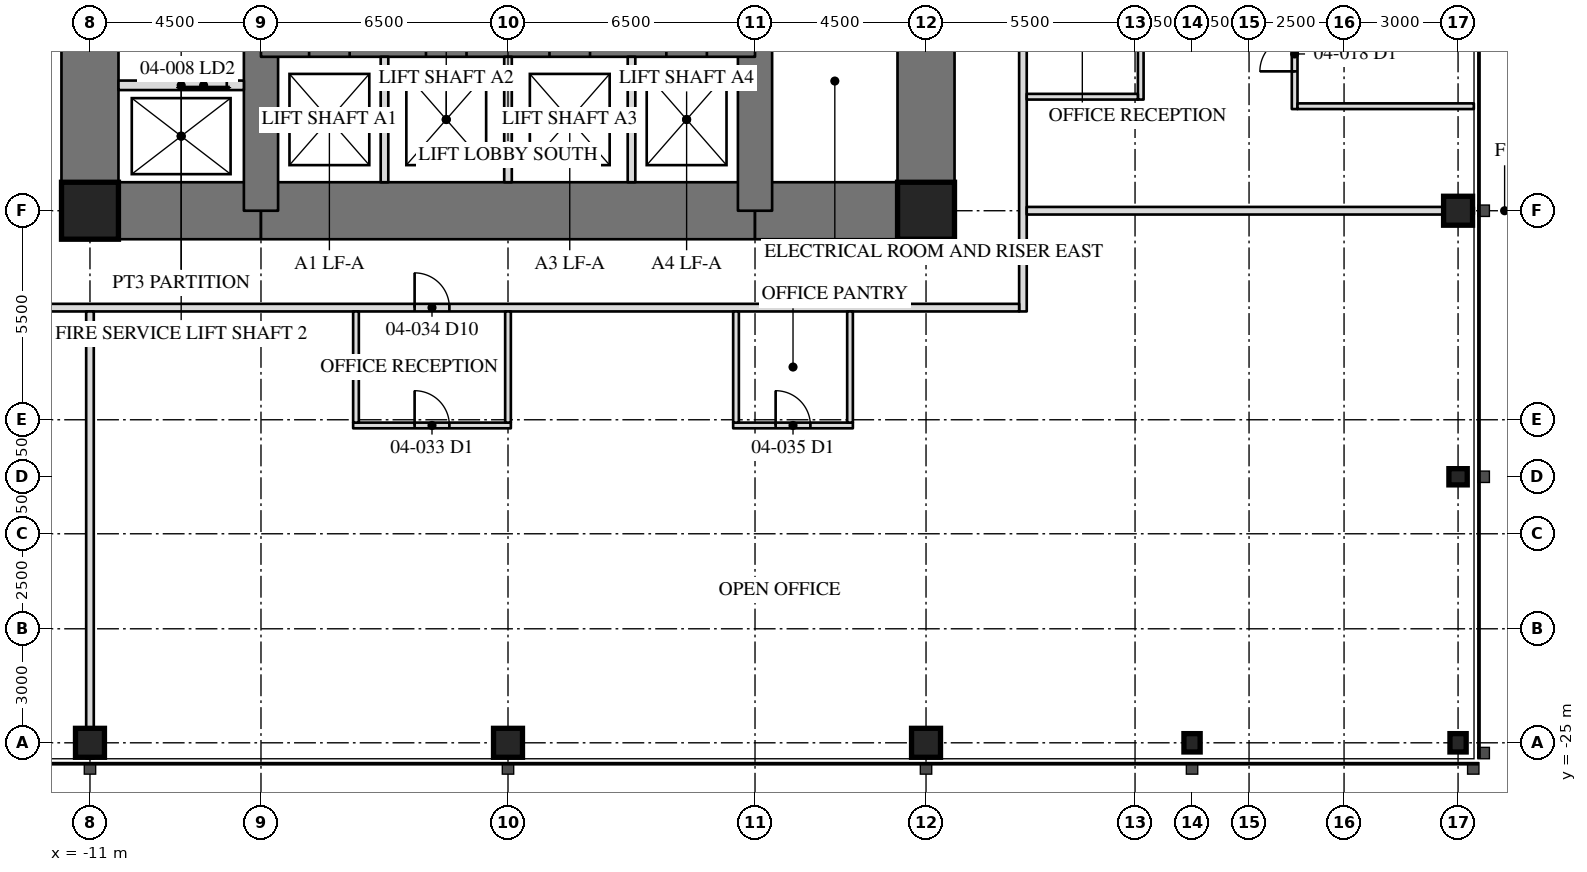
"""IFC4 building model, lengths in metres.
Left out: names, types, materials, properties, quantities, classifications, styles, units other than length and angle.
Written with IfcOpenShell. Run it as: python <this file> out.ifc"""

import sys

from ifc_helpers import new_model, si_unit, direction, frame, frame_2d, origin, origin_2d, place, context, subcontext, project, spatial, rectangle, hollow_rectangle, i_section, extrude, element, fill, save


model = new_model("IFC4")
c1 = context("Model", 3, precision=1e-05, world=origin(), true_north=direction((0.0, 1.0)))
c2 = subcontext(c1, "Body", "Model", "MODEL_VIEW")
j1 = project(units=[si_unit("LENGTHUNIT", "METRE"), si_unit("PLANEANGLEUNIT", "RADIAN")], contexts=[c1])
p1 = place(None, origin())
s1 = spatial("IfcSite", under=j1, at=p1, CompositionType="ELEMENT")
p2 = place(p1, origin())
s2 = spatial("IfcBuilding", under=s1, at=p2, CompositionType="ELEMENT")
p3 = place(p2, frame((0.0, 0.0, 20.1)))
s3 = spatial("IfcBuildingStorey", under=s2, at=p3, CompositionType="ELEMENT", Elevation=20.1)
for number, where, z_axis, x_axis in (
    (1, (-11.0, -25.0, 0.0), (0.0, 0.0, 1.0), (1.0, 0.0, 0.0)),
    (2, (0.0, -25.0, 0.0), (0.0, 0.0, 1.0), (1.0, 0.0, 0.0)),
    (3, (11.0, -25.0, 0.0), (0.0, 0.0, 1.0), (1.0, 0.0, 0.0)),
):
    element("IfcColumn", number, at=place(p3, frame(where, z_axis=z_axis, x_axis=x_axis)), inside=s3, PredefinedType="COLUMN", context=c2, shape_type="SweptSolid", body=[
        extrude(hollow_rectangle(XDim=0.762, YDim=0.762, WallThickness=0.152, at=origin_2d()), origin(), (0.0, 0.0, 1.0), 4.1),
    ])
for number, where, z_axis, x_axis in (
    (4, (18.0, -25.0, 0.0), (0.0, 0.0, 1.0), (1.0, 0.0, 0.0)),
    (5, (25.0, -25.0, 0.0), (0.0, 0.0, 1.0), (1.0, 0.0, 0.0)),
    (6, (25.0, -18.0, 0.0), (0.0, 0.0, 1.0), (0.0, 1.0, 0.0)),
):
    element("IfcColumn", number, at=place(p3, frame(where, z_axis=z_axis, x_axis=x_axis)), inside=s3, PredefinedType="COLUMN", context=c2, shape_type="SweptSolid", body=[
        extrude(i_section(OverallWidth=0.427, OverallDepth=0.483, WebThickness=0.051, FlangeThickness=0.082, at=origin_2d()), origin(), (0.0, 0.0, 1.0), 4.1),
    ])
p4 = place(p3, frame((25.0, -11.0, 0.0), z_axis=(0.0, 0.0, 1.0), x_axis=(0.0, 1.0, 0.0)))
e7 = element("IfcColumn", 7, at=p4, inside=s3, PredefinedType="COLUMN", context=c2, shape_type="SweptSolid", body=[
    extrude(hollow_rectangle(XDim=0.762, YDim=0.762, WallThickness=0.152, at=origin_2d()), origin(), (0.0, 0.0, 1.0), 4.1),
])
p5 = place(p3, frame((11.0, -11.0, 0.0), z_axis=(0.0, 0.0, 1.0), x_axis=(0.0, 1.0, 0.0)))
e8 = element("IfcWall", 8, at=p5, inside=s3, PredefinedType="SHEAR", context=c2, shape_type="SweptSolid", body=[
    extrude(rectangle(XDim=22.0, YDim=1.5, at=frame_2d((11.0, 0.0))), origin(), (0.0, 0.0, 1.0), 4.1),
])
p6 = place(p5, frame((15.393, 0.0, 0.0)))
e9 = element("IfcOpeningElement", 9, at=p6, cuts=e8, PredefinedType="OPENING", context=c2, shape_type="SweptSolid", body=[
    extrude(rectangle(XDim=0.915, YDim=2.134, at=frame_2d((0.458, 1.067))), frame((0.0, 0.76, 0.0), z_axis=(0.0, -1.0, 0.0), x_axis=(1.0, 0.0, 0.0)), (0.0, 0.0, 1.0), 1.52),
])
p7 = place(p3, frame((-11.0, 11.0, 0.0), z_axis=(0.0, 0.0, 1.0), x_axis=(0.0, -1.0, 0.0)))
e10 = element("IfcWall", 10, at=p7, inside=s3, PredefinedType="SHEAR", context=c2, shape_type="SweptSolid", body=[
    extrude(rectangle(XDim=22.0, YDim=1.5, at=frame_2d((11.0, 0.0))), origin(), (0.0, 0.0, 1.0), 4.1),
])
p8 = place(p7, frame((15.393, 0.0, 0.0)))
e11 = element("IfcOpeningElement", 11, at=p8, cuts=e10, PredefinedType="OPENING", context=c2, shape_type="SweptSolid", body=[
    extrude(rectangle(XDim=0.915, YDim=2.134, at=frame_2d((0.458, 1.067))), frame((0.0, 0.76, 0.0), z_axis=(0.0, -1.0, 0.0), x_axis=(1.0, 0.0, 0.0)), (0.0, 0.0, 1.0), 1.52),
])
p9 = place(p3, frame((-11.0, -11.0, 0.0), z_axis=(0.0, 0.0, 1.0), x_axis=(1.0, 0.0, 0.0)))
e12 = element("IfcWall", 12, at=p9, inside=s3, PredefinedType="SHEAR", context=c2, shape_type="SweptSolid", body=[
    extrude(rectangle(XDim=4.5, YDim=1.5, at=frame_2d((2.25, 0.0))), origin(), (0.0, 0.0, 1.0), 4.1),
])
p10 = place(p3, frame((-6.5, -11.0, 0.0), z_axis=(0.0, 0.0, 1.0), x_axis=(1.0, 0.0, 0.0)))
e13 = element("IfcWall", 13, at=p10, inside=s3, PredefinedType="SHEAR", context=c2, shape_type="SweptSolid", body=[
    extrude(rectangle(XDim=13.0, YDim=1.5, at=frame_2d((6.5, 0.0))), origin(), (0.0, 0.0, 1.0), 4.1),
])
p11 = place(p3, frame((6.5, -11.0, 0.0), z_axis=(0.0, 0.0, 1.0), x_axis=(1.0, 0.0, 0.0)))
e14 = element("IfcWall", 14, at=p11, inside=s3, PredefinedType="SHEAR", context=c2, shape_type="SweptSolid", body=[
    extrude(rectangle(XDim=4.5, YDim=1.5, at=frame_2d((2.25, 0.0))), origin(), (0.0, 0.0, 1.0), 4.1),
])
for number, where, z_axis, x_axis in (
    (15, (6.5, -11.0, 0.0), (0.0, 0.0, 1.0), (0.0, 1.0, 0.0)),
    (16, (-6.5, -6.5, 0.0), (0.0, 0.0, 1.0), (0.0, -1.0, 0.0)),
):
    element("IfcWall", number, at=place(p3, frame(where, z_axis=z_axis, x_axis=x_axis)), inside=s3, PredefinedType="SHEAR", context=c2, shape_type="SweptSolid", body=[
        extrude(rectangle(XDim=4.5, YDim=0.9, at=frame_2d((2.25, 0.0))), origin(), (0.0, 0.0, 1.0), 4.1),
    ])
p12 = place(p3, frame((-6.5, -6.5, 0.0), z_axis=(0.0, 0.0, 1.0), x_axis=(1.0, 0.0, 0.0)))
e17 = element("IfcWall", 17, at=p12, inside=s3, PredefinedType="SHEAR", context=c2, shape_type="SweptSolid", body=[
    extrude(rectangle(XDim=13.0, YDim=0.9, at=frame_2d((6.5, 0.0))), origin(), (0.0, 0.0, 1.0), 4.1),
])
p13 = place(p12, frame((1.267, 0.0, 0.0)))
e18 = element("IfcOpeningElement", 18, at=p13, cuts=e17, PredefinedType="OPENING", context=c2, shape_type="SweptSolid", body=[
    extrude(rectangle(XDim=1.067, YDim=2.134, at=frame_2d((0.533, 1.067))), frame((0.0, 0.46, 0.0), z_axis=(0.0, -1.0, 0.0), x_axis=(1.0, 0.0, 0.0)), (0.0, 0.0, 1.0), 0.92),
])
p14 = place(p12, frame((4.342, 0.0, 0.0)))
e19 = element("IfcOpeningElement", 19, at=p14, cuts=e17, PredefinedType="OPENING", context=c2, shape_type="SweptSolid", body=[
    extrude(rectangle(XDim=1.067, YDim=2.134, at=frame_2d((0.533, 1.067))), frame((0.0, 0.46, 0.0), z_axis=(0.0, -1.0, 0.0), x_axis=(1.0, 0.0, 0.0)), (0.0, 0.0, 1.0), 0.92),
])
p15 = place(p12, frame((7.592, 0.0, 0.0)))
e20 = element("IfcOpeningElement", 20, at=p15, cuts=e17, PredefinedType="OPENING", context=c2, shape_type="SweptSolid", body=[
    extrude(rectangle(XDim=1.067, YDim=2.134, at=frame_2d((0.533, 1.067))), frame((0.0, 0.46, 0.0), z_axis=(0.0, -1.0, 0.0), x_axis=(1.0, 0.0, 0.0)), (0.0, 0.0, 1.0), 0.92),
])
p16 = place(p12, frame((10.667, 0.0, 0.0)))
e21 = element("IfcOpeningElement", 21, at=p16, cuts=e17, PredefinedType="OPENING", context=c2, shape_type="SweptSolid", body=[
    extrude(rectangle(XDim=1.067, YDim=2.134, at=frame_2d((0.533, 1.067))), frame((0.0, 0.46, 0.0), z_axis=(0.0, -1.0, 0.0), x_axis=(1.0, 0.0, 0.0)), (0.0, 0.0, 1.0), 0.92),
])
for number, where, z_axis, x_axis in (
    (22, (-11.0, -11.0, 0.0), (0.0, 0.0, 1.0), (1.0, 0.0, 0.0)),
    (23, (11.0, -11.0, 0.0), (0.0, 0.0, 1.0), (1.0, 0.0, 0.0)),
):
    element("IfcColumn", number, at=place(p3, frame(where, z_axis=z_axis, x_axis=x_axis)), inside=s3, PredefinedType="COLUMN", context=c2, shape_type="SweptSolid", body=[
        extrude(hollow_rectangle(XDim=1.499, YDim=1.499, WallThickness=0.102, at=origin_2d()), origin(), (0.0, 0.0, 1.0), 4.1),
    ])
p17 = place(p3, frame((-6.95, -7.7, 0.0), z_axis=(0.0, 0.0, 1.0), x_axis=(-1.0, 0.0, 0.0)))
e24 = element("IfcWall", 24, at=p17, inside=s3, PredefinedType="PARTITIONING", context=c2, shape_type="SweptSolid", body=[
    extrude(rectangle(XDim=3.3, YDim=0.25, at=frame_2d((1.65, 0.0))), origin(), (0.0, 0.0, 1.0), 3.91),
])
p18 = place(p17, frame((0.45, 0.0, 0.0)))
e25 = element("IfcOpeningElement", 25, at=p18, cuts=e24, PredefinedType="OPENING", context=c2, shape_type="SweptSolid", body=[
    extrude(rectangle(XDim=1.219, YDim=2.134, at=frame_2d((0.609, 1.067))), frame((0.0, 0.135, 0.0), z_axis=(0.0, -1.0, 0.0), x_axis=(1.0, 0.0, 0.0)), (0.0, 0.0, 1.0), 0.27),
])
for number, where, z_axis, x_axis in (
    (26, (-3.25, -10.25, 0.0), (0.0, 0.0, 1.0), (0.0, 1.0, 0.0)),
    (27, (0.0, -10.25, 0.0), (0.0, 0.0, 1.0), (0.0, 1.0, 0.0)),
    (28, (3.25, -10.25, 0.0), (0.0, 0.0, 1.0), (0.0, 1.0, 0.0)),
):
    element("IfcWall", number, at=place(p3, frame(where, z_axis=z_axis, x_axis=x_axis)), inside=s3, PredefinedType="PARTITIONING", context=c2, shape_type="SweptSolid", body=[
        extrude(rectangle(XDim=3.3, YDim=0.2, at=frame_2d((1.65, 0.0))), origin(), (0.0, 0.0, 1.0), 3.91),
    ])
p19 = place(p3, frame((13.55, -13.65, 0.0), z_axis=(0.0, 0.0, 1.0), x_axis=(0.0, 1.0, 0.0)))
e29 = element("IfcWall", 29, at=p19, inside=s3, PredefinedType="PARTITIONING", context=c2, shape_type="SweptSolid", body=[
    extrude(rectangle(XDim=27.1, YDim=0.2, at=frame_2d((13.55, 0.0))), origin(), (0.0, 0.0, 1.0), 3.91),
])
p20 = place(p19, frame((7.192, 0.0, 0.0)))
e30 = element("IfcOpeningElement", 30, at=p20, cuts=e29, PredefinedType="OPENING", context=c2, shape_type="SweptSolid", body=[
    extrude(rectangle(XDim=0.915, YDim=2.134, at=frame_2d((0.458, 1.067))), frame((0.0, 0.11, 0.0), z_axis=(0.0, -1.0, 0.0), x_axis=(1.0, 0.0, 0.0)), (0.0, 0.0, 1.0), 0.22),
])
p21 = place(p3, frame((-13.65, -13.55, 0.0), z_axis=(0.0, 0.0, 1.0), x_axis=(1.0, 0.0, 0.0)))
e31 = element("IfcWall", 31, at=p21, inside=s3, PredefinedType="PARTITIONING", context=c2, shape_type="SweptSolid", body=[
    extrude(rectangle(XDim=27.1, YDim=0.2, at=frame_2d((13.55, 0.0))), origin(), (0.0, 0.0, 1.0), 3.91),
])
p22 = place(p21, frame((11.192, 0.0, 0.0)))
e32 = element("IfcOpeningElement", 32, at=p22, cuts=e31, PredefinedType="OPENING", context=c2, shape_type="SweptSolid", body=[
    extrude(rectangle(XDim=0.915, YDim=2.134, at=frame_2d((0.458, 1.067))), frame((0.0, 0.11, 0.0), z_axis=(0.0, -1.0, 0.0), x_axis=(1.0, 0.0, 0.0)), (0.0, 0.0, 1.0), 0.22),
])
for number, where, z_axis, x_axis in (
    (33, (-11.0, -13.65, 0.0), (0.0, 0.0, 1.0), (0.0, -1.0, 0.0)),
    (34, (13.65, -11.0, 0.0), (0.0, 0.0, 1.0), (1.0, 0.0, 0.0)),
):
    element("IfcWall", number, at=place(p3, frame(where, z_axis=z_axis, x_axis=x_axis)), inside=s3, PredefinedType="PARTITIONING", context=c2, shape_type="SweptSolid", body=[
        extrude(rectangle(XDim=11.765, YDim=0.2, at=frame_2d((5.883, 0.0))), origin(), (0.0, 0.0, 1.0), 3.13),
    ])
p23 = place(p3, frame((20.7, -8.325, 0.0), z_axis=(0.0, 0.0, 1.0), x_axis=(0.0, 1.0, 0.0)))
e35 = element("IfcWall", 35, at=p23, inside=s3, PredefinedType="PARTITIONING", context=c2, shape_type="SweptSolid", body=[
    extrude(rectangle(XDim=11.15, YDim=0.15, at=frame_2d((5.575, 0.0))), origin(), (0.0, 0.0, 1.0), 3.91),
])
p24 = place(p23, frame((0.992, 0.0, 0.0)))
e36 = element("IfcOpeningElement", 36, at=p24, cuts=e35, PredefinedType="OPENING", context=c2, shape_type="SweptSolid", body=[
    extrude(rectangle(XDim=0.915, YDim=2.134, at=frame_2d((0.458, 1.067))), frame((0.0, 0.085, 0.0), z_axis=(0.0, -1.0, 0.0), x_axis=(1.0, 0.0, 0.0)), (0.0, 0.0, 1.0), 0.17),
])
p25 = place(p23, frame((3.742, 0.0, 0.0)))
e37 = element("IfcOpeningElement", 37, at=p25, cuts=e35, PredefinedType="OPENING", context=c2, shape_type="SweptSolid", body=[
    extrude(rectangle(XDim=0.915, YDim=2.134, at=frame_2d((0.458, 1.067))), frame((0.0, 0.085, 0.0), z_axis=(0.0, -1.0, 0.0), x_axis=(1.0, 0.0, 0.0)), (0.0, 0.0, 1.0), 0.17),
])
p26 = place(p23, frame((7.867, 0.0, 0.0)))
e38 = element("IfcOpeningElement", 38, at=p26, cuts=e35, PredefinedType="OPENING", context=c2, shape_type="SweptSolid", body=[
    extrude(rectangle(XDim=0.915, YDim=2.134, at=frame_2d((0.458, 1.067))), frame((0.0, 0.085, 0.0), z_axis=(0.0, -1.0, 0.0), x_axis=(1.0, 0.0, 0.0)), (0.0, 0.0, 1.0), 0.17),
])
p27 = place(p3, frame((20.775, -8.25, 0.0), z_axis=(0.0, 0.0, 1.0), x_axis=(1.0, 0.0, 0.0)))
e39 = element("IfcWall", 39, at=p27, inside=s3, PredefinedType="PARTITIONING", context=c2, shape_type="SweptSolid", body=[
    extrude(rectangle(XDim=4.64, YDim=0.15, at=frame_2d((2.32, 0.0))), origin(), (0.0, 0.0, 1.0), 3.91),
])
p28 = place(p3, frame((16.65, -8.075, 0.0), z_axis=(0.0, 0.0, 1.0), x_axis=(0.0, 1.0, 0.0)))
e40 = element("IfcWall", 40, at=p28, inside=s3, PredefinedType="PARTITIONING", context=c2, shape_type="SweptSolid", body=[
    extrude(rectangle(XDim=4.15, YDim=0.15, at=frame_2d((2.075, 0.0))), origin(), (0.0, 0.0, 1.0), 3.91),
])
p29 = place(p28, frame((1.617, 0.0, 0.0)))
e41 = element("IfcOpeningElement", 41, at=p29, cuts=e40, PredefinedType="OPENING", context=c2, shape_type="SweptSolid", body=[
    extrude(rectangle(XDim=0.915, YDim=2.134, at=frame_2d((0.458, 1.067))), frame((0.0, 0.085, 0.0), z_axis=(0.0, -1.0, 0.0), x_axis=(1.0, 0.0, 0.0)), (0.0, 0.0, 1.0), 0.17),
])
p30 = place(p3, frame((16.575, -8.0, 0.0), z_axis=(0.0, 0.0, 1.0), x_axis=(-1.0, 0.0, 0.0)))
e42 = element("IfcWall", 42, at=p30, inside=s3, PredefinedType="PARTITIONING", context=c2, shape_type="SweptSolid", body=[
    extrude(rectangle(XDim=2.925, YDim=0.15, at=frame_2d((1.462, 0.0))), origin(), (0.0, 0.0, 1.0), 3.91),
])
p31 = place(p3, frame((-4.075, -16.65, 0.0), z_axis=(0.0, 0.0, 1.0), x_axis=(1.0, 0.0, 0.0)))
e43 = element("IfcWall", 43, at=p31, inside=s3, PredefinedType="PARTITIONING", context=c2, shape_type="SweptSolid", body=[
    extrude(rectangle(XDim=4.15, YDim=0.15, at=frame_2d((2.075, 0.0))), origin(), (0.0, 0.0, 1.0), 3.91),
])
p32 = place(p31, frame((1.617, 0.0, 0.0)))
e44 = element("IfcOpeningElement", 44, at=p32, cuts=e43, PredefinedType="OPENING", context=c2, shape_type="SweptSolid", body=[
    extrude(rectangle(XDim=0.915, YDim=2.134, at=frame_2d((0.458, 1.067))), frame((0.0, 0.085, 0.0), z_axis=(0.0, -1.0, 0.0), x_axis=(1.0, 0.0, 0.0)), (0.0, 0.0, 1.0), 0.17),
])
p33 = place(p3, frame((-4.0, -16.575, 0.0), z_axis=(0.0, 0.0, 1.0), x_axis=(0.0, 1.0, 0.0)))
e45 = element("IfcWall", 45, at=p33, inside=s3, PredefinedType="PARTITIONING", context=c2, shape_type="SweptSolid", body=[
    extrude(rectangle(XDim=2.925, YDim=0.15, at=frame_2d((1.462, 0.0))), origin(), (0.0, 0.0, 1.0), 3.91),
])
p34 = place(p3, frame((0.0, -16.575, 0.0), z_axis=(0.0, 0.0, 1.0), x_axis=(0.0, 1.0, 0.0)))
e46 = element("IfcWall", 46, at=p34, inside=s3, PredefinedType="PARTITIONING", context=c2, shape_type="SweptSolid", body=[
    extrude(rectangle(XDim=2.925, YDim=0.15, at=frame_2d((1.462, 0.0))), origin(), (0.0, 0.0, 1.0), 3.13),
])
p35 = place(p3, frame((5.925, -16.65, 0.0), z_axis=(0.0, 0.0, 1.0), x_axis=(1.0, 0.0, 0.0)))
e47 = element("IfcWall", 47, at=p35, inside=s3, PredefinedType="PARTITIONING", context=c2, shape_type="SweptSolid", body=[
    extrude(rectangle(XDim=3.15, YDim=0.15, at=frame_2d((1.575, 0.0))), origin(), (0.0, 0.0, 1.0), 3.91),
])
p36 = place(p35, frame((1.117, 0.0, 0.0)))
e48 = element("IfcOpeningElement", 48, at=p36, cuts=e47, PredefinedType="OPENING", context=c2, shape_type="SweptSolid", body=[
    extrude(rectangle(XDim=0.915, YDim=2.134, at=frame_2d((0.458, 1.067))), frame((0.0, 0.085, 0.0), z_axis=(0.0, -1.0, 0.0), x_axis=(1.0, 0.0, 0.0)), (0.0, 0.0, 1.0), 0.17),
])
for number, where, z_axis, x_axis in (
    (49, (6.0, -16.575, 0.0), (0.0, 0.0, 1.0), (0.0, 1.0, 0.0)),
    (50, (9.0, -16.575, 0.0), (0.0, 0.0, 1.0), (0.0, 1.0, 0.0)),
):
    element("IfcWall", number, at=place(p3, frame(where, z_axis=z_axis, x_axis=x_axis)), inside=s3, PredefinedType="PARTITIONING", context=c2, shape_type="SweptSolid", body=[
        extrude(rectangle(XDim=2.925, YDim=0.15, at=frame_2d((1.462, 0.0))), origin(), (0.0, 0.0, 1.0), 3.91),
    ])
p37 = place(p18, origin())
e51 = element("IfcDoor", 51, at=p37, inside=s3, OperationType="SLIDING_TO_LEFT", PredefinedType="DOOR", context=c2, shape_type="SweptSolid", body=[
    extrude(rectangle(XDim=1.219, YDim=2.134, at=frame_2d((0.609, 1.067))), frame((0.0, 0.025, 0.0), z_axis=(0.0, -1.0, 0.0), x_axis=(1.0, 0.0, 0.0)), (0.0, 0.0, 1.0), 0.05),
])
fill(e25, e51)
p38 = place(p13, origin())
e52 = element("IfcDoor", 52, at=p38, inside=s3, OperationType="SLIDING_TO_LEFT", PredefinedType="DOOR", context=c2, shape_type="SweptSolid", body=[
    extrude(rectangle(XDim=1.067, YDim=2.134, at=frame_2d((0.533, 1.067))), frame((0.0, -0.375, 0.0), z_axis=(0.0, -1.0, 0.0), x_axis=(1.0, 0.0, 0.0)), (0.0, 0.0, 1.0), 0.05),
])
fill(e18, e52)
p39 = place(p14, origin())
e53 = element("IfcDoor", 53, at=p39, inside=s3, OperationType="SLIDING_TO_LEFT", PredefinedType="DOOR", context=c2, shape_type="SweptSolid", body=[
    extrude(rectangle(XDim=1.067, YDim=2.134, at=frame_2d((0.533, 1.067))), frame((0.0, -0.375, 0.0), z_axis=(0.0, -1.0, 0.0), x_axis=(1.0, 0.0, 0.0)), (0.0, 0.0, 1.0), 0.05),
])
fill(e19, e53)
p40 = place(p15, origin())
e54 = element("IfcDoor", 54, at=p40, inside=s3, OperationType="SLIDING_TO_LEFT", PredefinedType="DOOR", context=c2, shape_type="SweptSolid", body=[
    extrude(rectangle(XDim=1.067, YDim=2.134, at=frame_2d((0.533, 1.067))), frame((0.0, -0.375, 0.0), z_axis=(0.0, -1.0, 0.0), x_axis=(1.0, 0.0, 0.0)), (0.0, 0.0, 1.0), 0.05),
])
fill(e20, e54)
p41 = place(p16, origin())
e55 = element("IfcDoor", 55, at=p41, inside=s3, OperationType="SLIDING_TO_LEFT", PredefinedType="DOOR", context=c2, shape_type="SweptSolid", body=[
    extrude(rectangle(XDim=1.067, YDim=2.134, at=frame_2d((0.533, 1.067))), frame((0.0, -0.375, 0.0), z_axis=(0.0, -1.0, 0.0), x_axis=(1.0, 0.0, 0.0)), (0.0, 0.0, 1.0), 0.05),
])
fill(e21, e55)
p42 = place(p24, origin())
e56 = element("IfcDoor", 56, at=p42, inside=s3, OperationType="SINGLE_SWING_LEFT", PredefinedType="DOOR", context=c2, shape_type="SweptSolid", body=[
    extrude(rectangle(XDim=0.915, YDim=2.134, at=frame_2d((0.458, 1.067))), frame((0.0, 0.025, 0.0), z_axis=(0.0, -1.0, 0.0), x_axis=(1.0, 0.0, 0.0)), (0.0, 0.0, 1.0), 0.05),
])
fill(e36, e56)
p43 = place(p32, origin())
e57 = element("IfcDoor", 57, at=p43, inside=s3, OperationType="SINGLE_SWING_LEFT", PredefinedType="DOOR", context=c2, shape_type="SweptSolid", body=[
    extrude(rectangle(XDim=0.915, YDim=2.134, at=frame_2d((0.458, 1.067))), frame((0.0, 0.025, 0.0), z_axis=(0.0, -1.0, 0.0), x_axis=(1.0, 0.0, 0.0)), (0.0, 0.0, 1.0), 0.05),
])
fill(e44, e57)
p44 = place(p22, origin())
e58 = element("IfcDoor", 58, at=p44, inside=s3, OperationType="SINGLE_SWING_LEFT", PredefinedType="DOOR", context=c2, shape_type="SweptSolid", body=[
    extrude(rectangle(XDim=0.915, YDim=2.134, at=frame_2d((0.458, 1.067))), frame((0.0, 0.025, 0.0), z_axis=(0.0, -1.0, 0.0), x_axis=(1.0, 0.0, 0.0)), (0.0, 0.0, 1.0), 0.05),
])
fill(e32, e58)
p45 = place(p36, origin())
e59 = element("IfcDoor", 59, at=p45, inside=s3, OperationType="SINGLE_SWING_LEFT", PredefinedType="DOOR", context=c2, shape_type="SweptSolid", body=[
    extrude(rectangle(XDim=0.915, YDim=2.134, at=frame_2d((0.458, 1.067))), frame((0.0, 0.025, 0.0), z_axis=(0.0, -1.0, 0.0), x_axis=(1.0, 0.0, 0.0)), (0.0, 0.0, 1.0), 0.05),
])
fill(e48, e59)
save(model, sys.argv[1])
